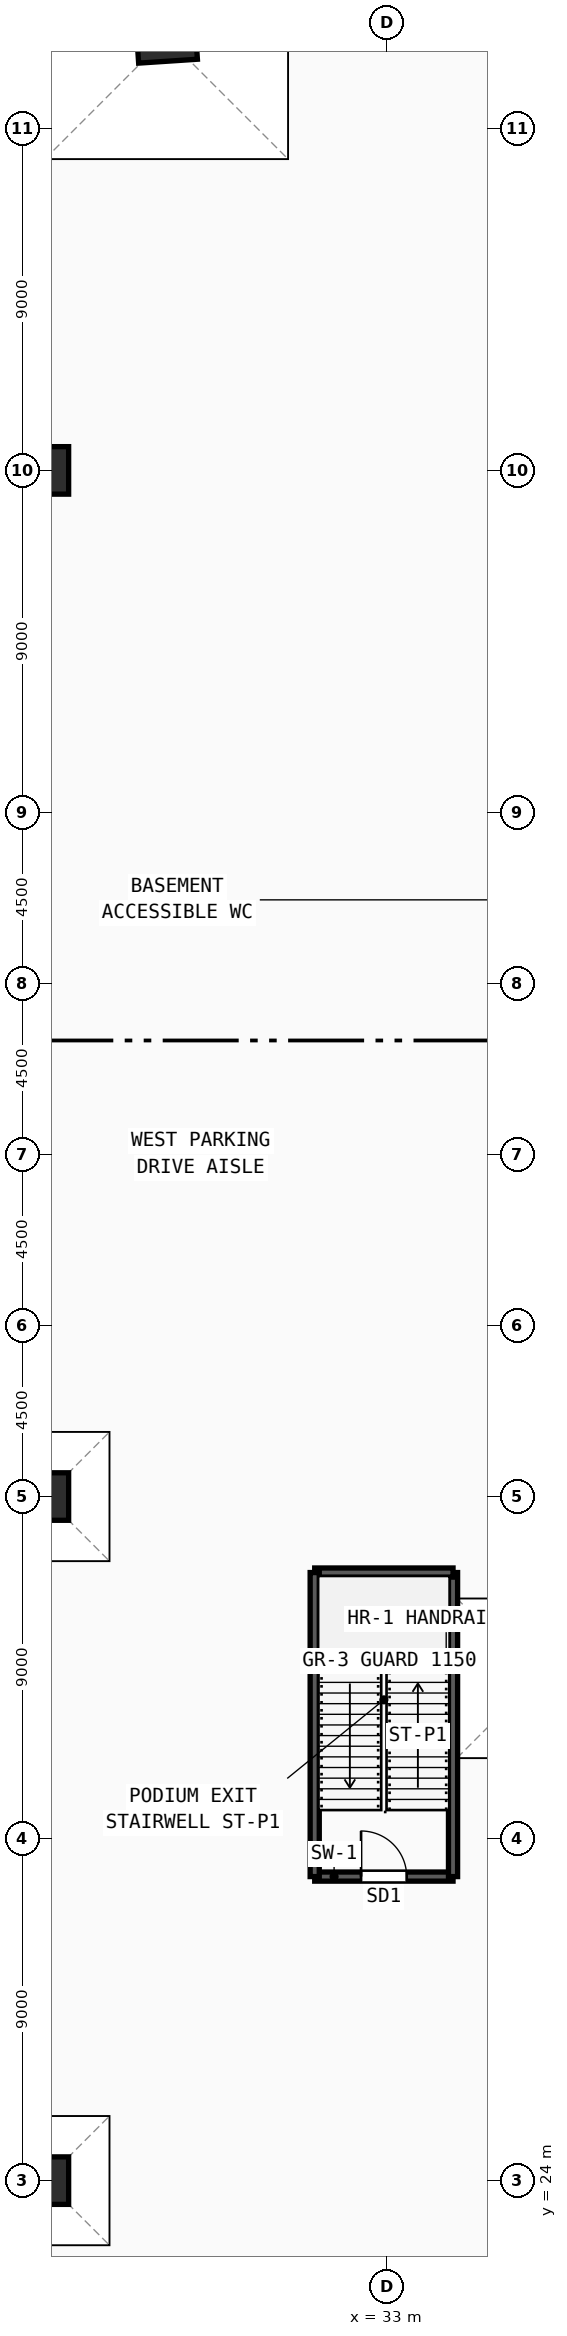
"""IFC4 building model, lengths in metres.
Left out: names, types, materials, properties, quantities, classifications, styles, units other than length and angle.
Written with IfcOpenShell. Run it as: python <this file> out.ifc"""

import sys

from ifc_helpers import new_model, si_unit, direction, frame, frame_2d, origin, origin_2d, place, context, subcontext, project, spatial, rectangle, extrude, source, transform, mapped, element, fill, save


model = new_model("IFC4")
c1 = context("Model", 3, precision=1e-05, world=origin(), true_north=direction((0.0, 1.0)))
c2 = subcontext(c1, "Body", "Model", "MODEL_VIEW")
j1 = project(units=[si_unit("LENGTHUNIT", "METRE"), si_unit("PLANEANGLEUNIT", "RADIAN")], contexts=[c1])
p1 = place(None, origin())
s1 = spatial("IfcSite", under=j1, at=p1, CompositionType="ELEMENT")
p2 = place(p1, origin())
s2 = spatial("IfcBuilding", under=s1, at=p2, CompositionType="ELEMENT")
p3 = place(p2, frame((0.0, 0.0, -9.6)))
s3 = spatial("IfcBuildingStorey", under=s2, at=p3, CompositionType="ELEMENT", Elevation=-9.6)
m1 = source(origin(), c2, "Body", "SweptSolid", [
    extrude(rectangle(XDim=1.55, YDim=1.25, at=origin_2d()), origin(), (0.0, 0.0, 1.0), 4.8),
])
p4 = place(p3, frame((27.199, 80.391, 0.0), z_axis=(0.0, 0.0, 1.0), x_axis=(0.997824541457, 0.065925597951, 0.0)))
e1 = element("IfcColumn", 1, at=p4, inside=s3, PredefinedType="COLUMN", context=c2, shape_type="MappedRepresentation", body=[
    mapped(m1, transform((0.0, 0.0, 0.0), x_axis=(1.0, 0.0, 0.0), y_axis=(0.0, 1.0, 0.0), z_axis=(0.0, 0.0, 1.0), scale=1.0)),
])
m2 = source(origin(), c2, "Body", "SweptSolid", [
    extrude(rectangle(XDim=1.25, YDim=1.25, at=origin_2d()), origin(), (0.0, 0.0, 1.0), 4.8),
])
for number, where, z_axis, x_axis in (
    (2, (24.0, 24.0, 0.0), (0.0, 0.0, 1.0), (1.0, 0.0, 0.0)),
    (3, (24.0, 42.0, 0.0), (0.0, 0.0, 1.0), (1.0, 0.0, 0.0)),
    (4, (24.0, 69.0, 0.0), (0.0, 0.0, 1.0), (1.0, 0.0, 0.0)),
):
    element("IfcColumn", number, at=place(p3, frame(where, z_axis=z_axis, x_axis=x_axis)), inside=s3, PredefinedType="COLUMN", context=c2, shape_type="MappedRepresentation", body=[
        mapped(m2, transform((0.0, 0.0, 0.0), x_axis=(1.0, 0.0, 0.0), y_axis=(0.0, 1.0, 0.0), z_axis=(0.0, 0.0, 1.0), scale=1.0)),
    ])
p5 = place(p3, frame((31.1, 32.0, 0.0), z_axis=(0.0, 0.0, 1.0), x_axis=(1.0, 0.0, 0.0)))
e5 = element("IfcWall", 5, at=p5, inside=s3, PredefinedType="SOLIDWALL", context=c2, shape_type="SweptSolid", body=[
    extrude(rectangle(XDim=3.64, YDim=0.24, at=frame_2d((1.82, 0.0))), origin(), (0.0, 0.0, 1.0), 4.5),
])
m3 = source(origin(), c2, "Body", "SweptSolid", [
    extrude(rectangle(XDim=1.2, YDim=2.2, at=frame_2d((0.6, 1.1))), frame((0.0, 0.13, 0.0), z_axis=(0.0, -1.0, 0.0), x_axis=(1.0, 0.0, 0.0)), (0.0, 0.0, 1.0), 0.26),
])
p6 = place(p5, frame((1.22, 0.0, 0.0)))
e6 = element("IfcOpeningElement", 6, at=p6, cuts=e5, PredefinedType="OPENING", context=c2, shape_type="MappedRepresentation", body=[
    mapped(m3, transform((0.0, 0.0, 0.0), x_axis=(1.0, 0.0, 0.0), y_axis=(0.0, 1.0, 0.0), z_axis=(0.0, 0.0, 1.0), scale=1.0)),
])
p7 = place(p3, frame((34.74, 32.0, 0.0), z_axis=(0.0, 0.0, 1.0), x_axis=(0.0, 1.0, 0.0)))
e7 = element("IfcWall", 7, at=p7, inside=s3, PredefinedType="SOLIDWALL", context=c2, shape_type="SweptSolid", body=[
    extrude(rectangle(XDim=8.0, YDim=0.24, at=frame_2d((4.0, 0.0))), origin(), (0.0, 0.0, 1.0), 4.5),
])
p8 = place(p3, frame((34.74, 40.0, 0.0), z_axis=(0.0, 0.0, 1.0), x_axis=(-1.0, 0.0, 0.0)))
e8 = element("IfcWall", 8, at=p8, inside=s3, PredefinedType="SOLIDWALL", context=c2, shape_type="SweptSolid", body=[
    extrude(rectangle(XDim=3.64, YDim=0.24, at=frame_2d((1.82, 0.0))), origin(), (0.0, 0.0, 1.0), 4.5),
])
p9 = place(p3, frame((31.1, 40.0, 0.0), z_axis=(0.0, 0.0, 1.0), x_axis=(0.0, -1.0, 0.0)))
e9 = element("IfcWall", 9, at=p9, inside=s3, PredefinedType="SOLIDWALL", context=c2, shape_type="SweptSolid", body=[
    extrude(rectangle(XDim=8.0, YDim=0.24, at=frame_2d((4.0, 0.0))), origin(), (0.0, 0.0, 1.0), 4.5),
])
m4 = source(origin(), c2, "Body", "SweptSolid", [
    extrude(rectangle(XDim=1.2, YDim=2.2, at=frame_2d((0.6, 1.1))), frame((0.0, 0.025, 0.0), z_axis=(0.0, -1.0, 0.0), x_axis=(1.0, 0.0, 0.0)), (0.0, 0.0, 1.0), 0.05),
])
p10 = place(p6, origin())
e10 = element("IfcDoor", 10, at=p10, inside=s3, OperationType="SINGLE_SWING_LEFT", PredefinedType="DOOR", context=c2, shape_type="MappedRepresentation", body=[
    mapped(m4, transform((0.0, 0.0, 0.0), x_axis=(1.0, 0.0, 0.0), y_axis=(0.0, 1.0, 0.0), z_axis=(0.0, 0.0, 1.0), scale=1.0)),
])
fill(e6, e10)
save(model, sys.argv[1])
